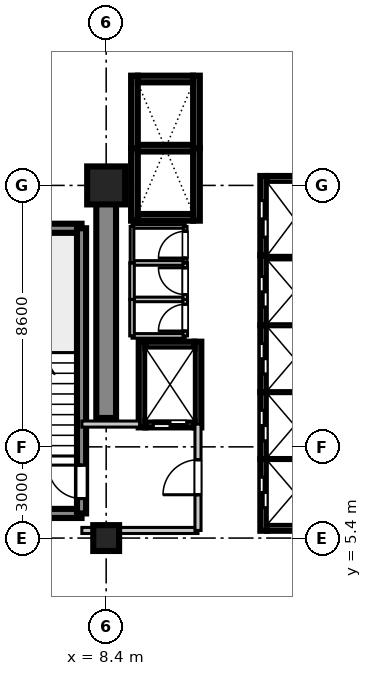
"""IFC4 building model, lengths in metres.
Left out: names, types, materials, properties, quantities, classifications, styles, units other than length and angle.
Written with IfcOpenShell. Run it as: python <this file> out.ifc"""

import sys

from ifc_helpers import new_model, si_unit, direction, frame, frame_2d, origin, origin_2d, place, context, subcontext, project, spatial, rectangle, extrude, source, transform, mapped, element, fill, save


model = new_model("IFC4")
c1 = context("Model", 3, precision=1e-05, world=origin(), true_north=direction((0.0, 1.0)))
c2 = subcontext(c1, "Body", "Model", "MODEL_VIEW")
j1 = project(units=[si_unit("LENGTHUNIT", "METRE"), si_unit("PLANEANGLEUNIT", "RADIAN")], contexts=[c1])
p1 = place(None, origin())
s1 = spatial("IfcSite", under=j1, at=p1, CompositionType="ELEMENT")
p2 = place(p1, origin())
s2 = spatial("IfcBuilding", under=s1, at=p2, CompositionType="ELEMENT")
p3 = place(p2, frame((0.0, 0.0, 88.3)))
s3 = spatial("IfcBuildingStorey", under=s2, at=p3, CompositionType="ELEMENT", Elevation=88.3)
m1 = source(origin(), c2, "Body", "SweptSolid", [
    extrude(rectangle(XDim=0.85, YDim=0.85, at=origin_2d()), origin(), (0.0, 0.0, 1.0), 3.605),
])
p4 = place(p3, frame((8.4, 5.4, 0.0), z_axis=(0.0, 0.0, 1.0), x_axis=(1.0, 0.0, 0.0)))
e1 = element("IfcColumn", 1, at=p4, inside=s3, PredefinedType="PILASTER", context=c2, shape_type="MappedRepresentation", body=[
    mapped(m1, transform((0.0, 0.0, 0.0), scale=1.0)),
])
m2 = source(origin(), c2, "Body", "SweptSolid", [
    extrude(rectangle(XDim=1.25, YDim=1.25, at=origin_2d()), origin(), (0.0, 0.0, 1.0), 3.605),
])
p5 = place(p3, frame((8.4, 17.0, 0.0), z_axis=(0.0, 0.0, 1.0), x_axis=(1.0, 0.0, 0.0)))
e2 = element("IfcColumn", 2, at=p5, inside=s3, PredefinedType="COLUMN", context=c2, shape_type="MappedRepresentation", body=[
    mapped(m2, transform((0.0, 0.0, 0.0), scale=1.0)),
])
m3 = source(origin(), c2, "Body", "SweptSolid", [
    extrude(rectangle(XDim=7.65, YDim=0.65, at=frame_2d((3.825, 0.0))), origin(), (0.0, 0.0, 1.0), 3.38),
])
p6 = place(p3, frame((8.4, 9.35, 0.0), z_axis=(0.0, 0.0, 1.0), x_axis=(0.0, 1.0, 0.0)))
e3 = element("IfcWall", 3, at=p6, inside=s3, PredefinedType="SHEAR", context=c2, shape_type="MappedRepresentation", body=[
    mapped(m3, transform((0.0, 0.0, 0.0), scale=1.0)),
])
m4 = source(origin(), c2, "Body", "SweptSolid", [
    extrude(rectangle(XDim=3.98, YDim=0.3, at=frame_2d((1.99, 0.0))), origin(), (0.0, 0.0, 1.0), 3.38),
])
for number, where, z_axis, x_axis in (
    (4, (3.61, 6.21, 0.0), (0.0, 0.0, 1.0), (1.0, 0.0, 0.0)),
    (5, (3.61, 15.59, 0.0), (0.0, 0.0, 1.0), (1.0, 0.0, 0.0)),
):
    element("IfcWall", number, at=place(p3, frame(where, z_axis=z_axis, x_axis=x_axis)), inside=s3, PredefinedType="SHEAR", context=c2, shape_type="MappedRepresentation", body=[
        mapped(m4, transform((0.0, 0.0, 0.0), scale=1.0)),
    ])
m5 = source(origin(), c2, "Body", "SweptSolid", [
    extrude(rectangle(XDim=9.38, YDim=0.3, at=frame_2d((4.69, 0.0))), origin(), (0.0, 0.0, 1.0), 3.38),
])
p7 = place(p3, frame((7.59, 6.21, 0.0), z_axis=(0.0, 0.0, 1.0), x_axis=(0.0, 1.0, 0.0)))
e6 = element("IfcWall", 6, at=p7, inside=s3, PredefinedType="SHEAR", context=c2, shape_type="MappedRepresentation", body=[
    mapped(m5, transform((0.0, 0.0, 0.0), scale=1.0)),
])
p8 = place(p7, frame((0.49, 0.0, 0.0)))
e7 = element("IfcOpeningElement", 7, at=p8, cuts=e6, PredefinedType="OPENING", context=c2, shape_type="SweptSolid", body=[
    extrude(rectangle(XDim=1.1, YDim=2.15, at=frame_2d((0.55, 1.075))), frame((0.0, 0.16, 0.0), z_axis=(0.0, -1.0, 0.0), x_axis=(1.0, 0.0, 0.0)), (0.0, 0.0, 1.0), 0.32),
])
m6 = source(origin(), c2, "Body", "SweptSolid", [
    extrude(rectangle(XDim=2.36, YDim=0.22, at=frame_2d((1.18, 0.0))), origin(), (0.0, 0.0, 1.0), 3.38),
])
p9 = place(p3, frame((13.58, 5.64, 0.0), z_axis=(0.0, 0.0, 1.0), x_axis=(0.0, 1.0, 0.0)))
e8 = element("IfcWall", 8, at=p9, inside=s3, PredefinedType="SHEAR", context=c2, shape_type="MappedRepresentation", body=[
    mapped(m6, transform((0.0, 0.0, 0.0), scale=1.0)),
])
p10 = place(p9, frame((0.76, 0.0, 0.0)))
e9 = element("IfcOpeningElement", 9, at=p10, cuts=e8, PredefinedType="OPENING", context=c2, shape_type="SweptSolid", body=[
    extrude(rectangle(XDim=1.0, YDim=2.2, at=frame_2d((0.5, 1.1))), frame((0.0, 0.12, 0.0), z_axis=(0.0, -1.0, 0.0), x_axis=(1.0, 0.0, 0.0)), (0.0, 0.0, 1.0), 0.24),
])
m7 = source(origin(), c2, "Body", "SweptSolid", [
    extrude(rectangle(XDim=1.82, YDim=0.22, at=frame_2d((0.91, 0.0))), origin(), (0.0, 0.0, 1.0), 3.38),
])
p11 = place(p3, frame((13.69, 5.75, 0.0), z_axis=(0.0, 0.0, 1.0), x_axis=(1.0, 0.0, 0.0)))
e10 = element("IfcWall", 10, at=p11, inside=s3, PredefinedType="SHEAR", context=c2, shape_type="MappedRepresentation", body=[
    mapped(m7, transform((0.0, 0.0, 0.0), scale=1.0)),
])
m8 = source(origin(), c2, "Body", "SweptSolid", [
    extrude(rectangle(XDim=1.82, YDim=0.22, at=frame_2d((0.91, 0.0))), origin(), (0.0, 0.0, 1.0), 3.65),
])
p12 = place(p3, frame((13.69, 8.0, 0.0), z_axis=(0.0, 0.0, 1.0), x_axis=(1.0, 0.0, 0.0)))
e11 = element("IfcWall", 11, at=p12, inside=s3, PredefinedType="SHEAR", context=c2, shape_type="MappedRepresentation", body=[
    mapped(m8, transform((0.0, 0.0, 0.0), scale=1.0)),
])
m9 = source(origin(), c2, "Body", "SweptSolid", [
    extrude(rectangle(XDim=2.2, YDim=0.22, at=frame_2d((1.1, 0.0))), origin(), (0.0, 0.0, 1.0), 3.38),
])
p13 = place(p3, frame((13.58, 8.0, 0.0), z_axis=(0.0, 0.0, 1.0), x_axis=(0.0, 1.0, 0.0)))
e12 = element("IfcWall", 12, at=p13, inside=s3, PredefinedType="SHEAR", context=c2, shape_type="MappedRepresentation", body=[
    mapped(m9, transform((0.0, 0.0, 0.0), scale=1.0)),
])
p14 = place(p13, frame((0.6, 0.0, 0.0)))
e13 = element("IfcOpeningElement", 13, at=p14, cuts=e12, PredefinedType="OPENING", context=c2, shape_type="SweptSolid", body=[
    extrude(rectangle(XDim=1.0, YDim=2.2, at=frame_2d((0.5, 1.1))), frame((0.0, 0.12, 0.0), z_axis=(0.0, -1.0, 0.0), x_axis=(1.0, 0.0, 0.0)), (0.0, 0.0, 1.0), 0.24),
])
p15 = place(p3, frame((13.69, 10.2, 0.0), z_axis=(0.0, 0.0, 1.0), x_axis=(1.0, 0.0, 0.0)))
e14 = element("IfcWall", 14, at=p15, inside=s3, PredefinedType="SHEAR", context=c2, shape_type="MappedRepresentation", body=[
    mapped(m8, transform((0.0, 0.0, 0.0), scale=1.0)),
])
p16 = place(p3, frame((13.58, 10.2, 0.0), z_axis=(0.0, 0.0, 1.0), x_axis=(0.0, 1.0, 0.0)))
e15 = element("IfcWall", 15, at=p16, inside=s3, PredefinedType="SHEAR", context=c2, shape_type="MappedRepresentation", body=[
    mapped(m9, transform((0.0, 0.0, 0.0), scale=1.0)),
])
p17 = place(p16, frame((0.6, 0.0, 0.0)))
e16 = element("IfcOpeningElement", 16, at=p17, cuts=e15, PredefinedType="OPENING", context=c2, shape_type="SweptSolid", body=[
    extrude(rectangle(XDim=1.0, YDim=2.2, at=frame_2d((0.5, 1.1))), frame((0.0, 0.12, 0.0), z_axis=(0.0, -1.0, 0.0), x_axis=(1.0, 0.0, 0.0)), (0.0, 0.0, 1.0), 0.24),
])
p18 = place(p3, frame((13.69, 12.4, 0.0), z_axis=(0.0, 0.0, 1.0), x_axis=(1.0, 0.0, 0.0)))
e17 = element("IfcWall", 17, at=p18, inside=s3, PredefinedType="SHEAR", context=c2, shape_type="MappedRepresentation", body=[
    mapped(m8, transform((0.0, 0.0, 0.0), scale=1.0)),
])
m10 = source(origin(), c2, "Body", "SweptSolid", [
    extrude(rectangle(XDim=2.3, YDim=0.22, at=frame_2d((1.15, 0.0))), origin(), (0.0, 0.0, 1.0), 3.38),
])
p19 = place(p3, frame((13.58, 12.4, 0.0), z_axis=(0.0, 0.0, 1.0), x_axis=(0.0, 1.0, 0.0)))
e18 = element("IfcWall", 18, at=p19, inside=s3, PredefinedType="SHEAR", context=c2, shape_type="MappedRepresentation", body=[
    mapped(m10, transform((0.0, 0.0, 0.0), scale=1.0)),
])
p20 = place(p19, frame((0.6, 0.0, 0.0)))
e19 = element("IfcOpeningElement", 19, at=p20, cuts=e18, PredefinedType="OPENING", context=c2, shape_type="SweptSolid", body=[
    extrude(rectangle(XDim=1.0, YDim=2.2, at=frame_2d((0.5, 1.1))), frame((0.0, 0.12, 0.0), z_axis=(0.0, -1.0, 0.0), x_axis=(1.0, 0.0, 0.0)), (0.0, 0.0, 1.0), 0.24),
])
p21 = place(p3, frame((13.69, 14.7, 0.0), z_axis=(0.0, 0.0, 1.0), x_axis=(1.0, 0.0, 0.0)))
e20 = element("IfcWall", 20, at=p21, inside=s3, PredefinedType="SHEAR", context=c2, shape_type="MappedRepresentation", body=[
    mapped(m8, transform((0.0, 0.0, 0.0), scale=1.0)),
])
m11 = source(origin(), c2, "Body", "SweptSolid", [
    extrude(rectangle(XDim=2.385, YDim=0.22, at=frame_2d((1.192, 0.0))), origin(), (0.0, 0.0, 1.0), 3.38),
])
for number, where, z_axis, x_axis in (
    (21, (9.33, 15.84, 0.0), (0.0, 0.0, 1.0), (0.0, 1.0, 0.0)),
    (22, (11.37, 15.84, 0.0), (0.0, 0.0, 1.0), (0.0, 1.0, 0.0)),
):
    element("IfcWall", number, at=place(p3, frame(where, z_axis=z_axis, x_axis=x_axis)), inside=s3, PredefinedType="SHEAR", context=c2, shape_type="MappedRepresentation", body=[
        mapped(m11, transform((0.0, 0.0, 0.0), scale=1.0)),
    ])
p22 = place(p3, frame((9.44, 15.95, 0.0), z_axis=(0.0, 0.0, 1.0), x_axis=(1.0, 0.0, 0.0)))
e23 = element("IfcWall", 23, at=p22, inside=s3, PredefinedType="SHEAR", context=c2, shape_type="MappedRepresentation", body=[
    mapped(m7, transform((0.0, 0.0, 0.0), scale=1.0)),
])
p23 = place(p3, frame((9.44, 18.225, 0.0), z_axis=(0.0, 0.0, 1.0), x_axis=(1.0, 0.0, 0.0)))
e24 = element("IfcWall", 24, at=p23, inside=s3, PredefinedType="SHEAR", context=c2, shape_type="MappedRepresentation", body=[
    mapped(m8, transform((0.0, 0.0, 0.0), scale=1.0)),
])
for number, where, z_axis, x_axis in (
    (25, (9.33, 18.225, 0.0), (0.0, 0.0, 1.0), (0.0, 1.0, 0.0)),
    (26, (11.37, 18.225, 0.0), (0.0, 0.0, 1.0), (0.0, 1.0, 0.0)),
):
    element("IfcWall", number, at=place(p3, frame(where, z_axis=z_axis, x_axis=x_axis)), inside=s3, PredefinedType="SHEAR", context=c2, shape_type="MappedRepresentation", body=[
        mapped(m11, transform((0.0, 0.0, 0.0), scale=1.0)),
    ])
p24 = place(p3, frame((9.44, 20.5, 0.0), z_axis=(0.0, 0.0, 1.0), x_axis=(1.0, 0.0, 0.0)))
e27 = element("IfcWall", 27, at=p24, inside=s3, PredefinedType="SHEAR", context=c2, shape_type="MappedRepresentation", body=[
    mapped(m7, transform((0.0, 0.0, 0.0), scale=1.0)),
])
m12 = source(origin(), c2, "Body", "SweptSolid", [
    extrude(rectangle(XDim=2.82, YDim=0.22, at=frame_2d((1.41, 0.0))), origin(), (0.0, 0.0, 1.0), 3.38),
])
for number, where, z_axis, x_axis in (
    (28, (9.58, 9.04, 0.0), (0.0, 0.0, 1.0), (0.0, 1.0, 0.0)),
    (29, (11.42, 9.04, 0.0), (0.0, 0.0, 1.0), (0.0, 1.0, 0.0)),
):
    element("IfcWall", number, at=place(p3, frame(where, z_axis=z_axis, x_axis=x_axis)), inside=s3, PredefinedType="SHEAR", context=c2, shape_type="MappedRepresentation", body=[
        mapped(m12, transform((0.0, 0.0, 0.0), scale=1.0)),
    ])
m13 = source(origin(), c2, "Body", "SweptSolid", [
    extrude(rectangle(XDim=1.62, YDim=0.22, at=frame_2d((0.81, 0.0))), origin(), (0.0, 0.0, 1.0), 3.38),
])
p25 = place(p3, frame((9.69, 9.15, 0.0), z_axis=(0.0, 0.0, 1.0), x_axis=(1.0, 0.0, 0.0)))
e30 = element("IfcWall", 30, at=p25, inside=s3, PredefinedType="SHEAR", context=c2, shape_type="MappedRepresentation", body=[
    mapped(m13, transform((0.0, 0.0, 0.0), scale=1.0)),
])
p26 = place(p25, frame((0.26, 0.0, 0.0)))
e31 = element("IfcOpeningElement", 31, at=p26, cuts=e30, PredefinedType="OPENING", context=c2, shape_type="SweptSolid", body=[
    extrude(rectangle(XDim=1.1, YDim=2.2, at=frame_2d((0.55, 1.1))), frame((0.0, 0.12, 0.0), z_axis=(0.0, -1.0, 0.0), x_axis=(1.0, 0.0, 0.0)), (0.0, 0.0, 1.0), 0.24),
])
p27 = place(p3, frame((9.69, 11.75, 0.0), z_axis=(0.0, 0.0, 1.0), x_axis=(1.0, 0.0, 0.0)))
e32 = element("IfcWall", 32, at=p27, inside=s3, PredefinedType="SHEAR", context=c2, shape_type="MappedRepresentation", body=[
    mapped(m13, transform((0.0, 0.0, 0.0), scale=1.0)),
])
m14 = source(origin(), c2, "Body", "SweptSolid", [
    extrude(rectangle(XDim=2.61, YDim=0.22, at=frame_2d((1.305, 0.0))), origin(), (0.0, 0.0, 1.0), 3.38),
])
p28 = place(p3, frame((13.58, 14.7, 0.0), z_axis=(0.0, 0.0, 1.0), x_axis=(0.0, 1.0, 0.0)))
e33 = element("IfcWall", 33, at=p28, inside=s3, PredefinedType="SHEAR", context=c2, shape_type="MappedRepresentation", body=[
    mapped(m14, transform((0.0, 0.0, 0.0), scale=1.0)),
])
p29 = place(p28, frame((0.6, 0.0, 0.0)))
e34 = element("IfcOpeningElement", 34, at=p29, cuts=e33, PredefinedType="OPENING", context=c2, shape_type="SweptSolid", body=[
    extrude(rectangle(XDim=1.2, YDim=2.2, at=frame_2d((0.6, 1.1))), frame((0.0, 0.12, 0.0), z_axis=(0.0, -1.0, 0.0), x_axis=(1.0, 0.0, 0.0)), (0.0, 0.0, 1.0), 0.24),
])
p30 = place(p3, frame((13.69, 17.2, 0.0), z_axis=(0.0, 0.0, 1.0), x_axis=(1.0, 0.0, 0.0)))
e35 = element("IfcWall", 35, at=p30, inside=s3, PredefinedType="SHEAR", context=c2, shape_type="MappedRepresentation", body=[
    mapped(m7, transform((0.0, 0.0, 0.0), scale=1.0)),
])
m15 = source(origin(), c2, "Body", "SweptSolid", [
    extrude(rectangle(XDim=3.82, YDim=0.2, at=frame_2d((1.91, 0.0))), origin(), (0.0, 0.0, 1.0), 2.72),
])
p31 = place(p3, frame((7.6, 5.65, 0.0), z_axis=(0.0, 0.0, 1.0), x_axis=(1.0, 0.0, 0.0)))
e36 = element("IfcWall", 36, at=p31, inside=s3, PredefinedType="PARTITIONING", context=c2, shape_type="MappedRepresentation", body=[
    mapped(m15, transform((0.0, 0.0, 0.0), scale=1.0)),
])
m16 = source(origin(), c2, "Body", "SweptSolid", [
    extrude(rectangle(XDim=1.9, YDim=0.2, at=frame_2d((0.95, 0.0))), origin(), (0.0, 0.0, 1.0), 2.72),
])
p32 = place(p3, frame((7.6, 9.15, 0.0), z_axis=(0.0, 0.0, 1.0), x_axis=(1.0, 0.0, 0.0)))
e37 = element("IfcWall", 37, at=p32, inside=s3, PredefinedType="PARTITIONING", context=c2, shape_type="MappedRepresentation", body=[
    mapped(m16, transform((0.0, 0.0, 0.0), scale=1.0)),
])
m17 = source(origin(), c2, "Body", "SweptSolid", [
    extrude(rectangle(XDim=3.5, YDim=0.2, at=frame_2d((1.75, 0.0))), origin(), (0.0, 0.0, 1.0), 2.72),
])
p33 = place(p3, frame((11.42, 5.65, 0.0), z_axis=(0.0, 0.0, 1.0), x_axis=(0.0, 1.0, 0.0)))
e38 = element("IfcWall", 38, at=p33, inside=s3, PredefinedType="PARTITIONING", context=c2, shape_type="MappedRepresentation", body=[
    mapped(m17, transform((0.0, 0.0, 0.0), scale=1.0)),
])
p34 = place(p33, frame((1.175, 0.0, 0.0)))
e39 = element("IfcOpeningElement", 39, at=p34, cuts=e38, PredefinedType="OPENING", context=c2, shape_type="SweptSolid", body=[
    extrude(rectangle(XDim=1.15, YDim=2.15, at=frame_2d((0.575, 1.075))), frame((0.0, 0.11, 0.0), z_axis=(0.0, -1.0, 0.0), x_axis=(1.0, 0.0, 0.0)), (0.0, 0.0, 1.0), 0.22),
])
m18 = source(origin(), c2, "Body", "SweptSolid", [
    extrude(rectangle(XDim=1.75, YDim=0.15, at=frame_2d((0.875, 0.0))), origin(), (0.0, 0.0, 1.0), 2.72),
])
for number, where, z_axis, x_axis in (
    (40, (9.25, 12.05, 0.0), (0.0, 0.0, 1.0), (1.0, 0.0, 0.0)),
    (41, (9.25, 13.25, 0.0), (0.0, 0.0, 1.0), (1.0, 0.0, 0.0)),
):
    element("IfcWall", number, at=place(p3, frame(where, z_axis=z_axis, x_axis=x_axis)), inside=s3, PredefinedType="PARTITIONING", context=c2, shape_type="MappedRepresentation", body=[
        mapped(m18, transform((0.0, 0.0, 0.0), scale=1.0)),
    ])
m19 = source(origin(), c2, "Body", "SweptSolid", [
    extrude(rectangle(XDim=1.2, YDim=0.15, at=frame_2d((0.6, 0.0))), origin(), (0.0, 0.0, 1.0), 2.72),
])
p35 = place(p3, frame((9.25, 12.05, 0.0), z_axis=(0.0, 0.0, 1.0), x_axis=(0.0, 1.0, 0.0)))
e42 = element("IfcWall", 42, at=p35, inside=s3, PredefinedType="PARTITIONING", context=c2, shape_type="MappedRepresentation", body=[
    mapped(m19, transform((0.0, 0.0, 0.0), scale=1.0)),
])
p36 = place(p3, frame((11.0, 12.05, 0.0), z_axis=(0.0, 0.0, 1.0), x_axis=(0.0, 1.0, 0.0)))
e43 = element("IfcWall", 43, at=p36, inside=s3, PredefinedType="PARTITIONING", context=c2, shape_type="MappedRepresentation", body=[
    mapped(m19, transform((0.0, 0.0, 0.0), scale=1.0)),
])
p37 = place(p36, frame((0.16, 0.0, 0.0)))
e44 = element("IfcOpeningElement", 44, at=p37, cuts=e43, PredefinedType="OPENING", context=c2, shape_type="SweptSolid", body=[
    extrude(rectangle(XDim=0.88, YDim=2.1, at=frame_2d((0.44, 1.05))), frame((0.0, 0.085, 0.0), z_axis=(0.0, -1.0, 0.0), x_axis=(1.0, 0.0, 0.0)), (0.0, 0.0, 1.0), 0.17),
])
p38 = place(p3, frame((9.25, 14.45, 0.0), z_axis=(0.0, 0.0, 1.0), x_axis=(1.0, 0.0, 0.0)))
e45 = element("IfcWall", 45, at=p38, inside=s3, PredefinedType="PARTITIONING", context=c2, shape_type="MappedRepresentation", body=[
    mapped(m18, transform((0.0, 0.0, 0.0), scale=1.0)),
])
p39 = place(p3, frame((9.25, 13.25, 0.0), z_axis=(0.0, 0.0, 1.0), x_axis=(0.0, 1.0, 0.0)))
e46 = element("IfcWall", 46, at=p39, inside=s3, PredefinedType="PARTITIONING", context=c2, shape_type="MappedRepresentation", body=[
    mapped(m19, transform((0.0, 0.0, 0.0), scale=1.0)),
])
p40 = place(p3, frame((11.0, 13.25, 0.0), z_axis=(0.0, 0.0, 1.0), x_axis=(0.0, 1.0, 0.0)))
e47 = element("IfcWall", 47, at=p40, inside=s3, PredefinedType="PARTITIONING", context=c2, shape_type="MappedRepresentation", body=[
    mapped(m19, transform((0.0, 0.0, 0.0), scale=1.0)),
])
p41 = place(p40, frame((0.16, 0.0, 0.0)))
e48 = element("IfcOpeningElement", 48, at=p41, cuts=e47, PredefinedType="OPENING", context=c2, shape_type="SweptSolid", body=[
    extrude(rectangle(XDim=0.88, YDim=2.1, at=frame_2d((0.44, 1.05))), frame((0.0, 0.085, 0.0), z_axis=(0.0, -1.0, 0.0), x_axis=(1.0, 0.0, 0.0)), (0.0, 0.0, 1.0), 0.17),
])
m20 = source(origin(), c2, "Body", "SweptSolid", [
    extrude(rectangle(XDim=1.75, YDim=0.12, at=frame_2d((0.875, 0.0))), origin(), (0.0, 0.0, 1.0), 2.72),
])
p42 = place(p3, frame((9.25, 15.65, 0.0), z_axis=(0.0, 0.0, 1.0), x_axis=(1.0, 0.0, 0.0)))
e49 = element("IfcWall", 49, at=p42, inside=s3, PredefinedType="PARTITIONING", context=c2, shape_type="MappedRepresentation", body=[
    mapped(m20, transform((0.0, 0.0, 0.0), scale=1.0)),
])
m21 = source(origin(), c2, "Body", "SweptSolid", [
    extrude(rectangle(XDim=1.2, YDim=0.12, at=frame_2d((0.6, 0.0))), origin(), (0.0, 0.0, 1.0), 2.72),
])
p43 = place(p3, frame((9.25, 14.45, 0.0), z_axis=(0.0, 0.0, 1.0), x_axis=(0.0, 1.0, 0.0)))
e50 = element("IfcWall", 50, at=p43, inside=s3, PredefinedType="PARTITIONING", context=c2, shape_type="MappedRepresentation", body=[
    mapped(m21, transform((0.0, 0.0, 0.0), scale=1.0)),
])
p44 = place(p3, frame((11.0, 14.45, 0.0), z_axis=(0.0, 0.0, 1.0), x_axis=(0.0, 1.0, 0.0)))
e51 = element("IfcWall", 51, at=p44, inside=s3, PredefinedType="PARTITIONING", context=c2, shape_type="MappedRepresentation", body=[
    mapped(m21, transform((0.0, 0.0, 0.0), scale=1.0)),
])
p45 = place(p44, frame((0.16, 0.0, 0.0)))
e52 = element("IfcOpeningElement", 52, at=p45, cuts=e51, PredefinedType="OPENING", context=c2, shape_type="SweptSolid", body=[
    extrude(rectangle(XDim=0.88, YDim=2.1, at=frame_2d((0.44, 1.05))), frame((0.0, 0.07, 0.0), z_axis=(0.0, -1.0, 0.0), x_axis=(1.0, 0.0, 0.0)), (0.0, 0.0, 1.0), 0.14),
])
m22 = source(origin(), c2, "Body", "SweptSolid", [
    extrude(rectangle(XDim=1.1, YDim=2.15, at=frame_2d((0.55, 1.075))), frame((0.0, 0.025, 0.0), z_axis=(0.0, -1.0, 0.0), x_axis=(1.0, 0.0, 0.0)), (0.0, 0.0, 1.0), 0.05),
])
p46 = place(p8, origin())
e53 = element("IfcDoor", 53, at=p46, inside=s3, OperationType="SINGLE_SWING_RIGHT", PredefinedType="DOOR", context=c2, shape_type="MappedRepresentation", body=[
    mapped(m22, transform((0.0, 0.0, 0.0), scale=1.0)),
])
fill(e7, e53)
m23 = source(origin(), c2, "Body", "SweptSolid", [
    extrude(rectangle(XDim=1.0, YDim=2.2, at=frame_2d((0.5, 1.1))), frame((0.0, 0.025, 0.0), z_axis=(0.0, -1.0, 0.0), x_axis=(1.0, 0.0, 0.0)), (0.0, 0.0, 1.0), 0.05),
])
p47 = place(p10, origin())
e54 = element("IfcDoor", 54, at=p47, inside=s3, OperationType="DOUBLE_DOOR_SLIDING", PredefinedType="DOOR", context=c2, shape_type="MappedRepresentation", body=[
    mapped(m23, transform((0.0, 0.0, 0.0), scale=1.0)),
])
fill(e9, e54)
p48 = place(p14, origin())
e55 = element("IfcDoor", 55, at=p48, inside=s3, OperationType="DOUBLE_DOOR_SLIDING", PredefinedType="DOOR", context=c2, shape_type="MappedRepresentation", body=[
    mapped(m23, transform((0.0, 0.0, 0.0), scale=1.0)),
])
fill(e13, e55)
p49 = place(p17, origin())
e56 = element("IfcDoor", 56, at=p49, inside=s3, OperationType="DOUBLE_DOOR_SLIDING", PredefinedType="DOOR", context=c2, shape_type="MappedRepresentation", body=[
    mapped(m23, transform((0.0, 0.0, 0.0), scale=1.0)),
])
fill(e16, e56)
p50 = place(p20, origin())
e57 = element("IfcDoor", 57, at=p50, inside=s3, OperationType="DOUBLE_DOOR_SLIDING", PredefinedType="DOOR", context=c2, shape_type="MappedRepresentation", body=[
    mapped(m23, transform((0.0, 0.0, 0.0), scale=1.0)),
])
fill(e19, e57)
m24 = source(origin(), c2, "Body", "SweptSolid", [
    extrude(rectangle(XDim=1.1, YDim=2.2, at=frame_2d((0.55, 1.1))), frame((0.0, 0.025, 0.0), z_axis=(0.0, -1.0, 0.0), x_axis=(1.0, 0.0, 0.0)), (0.0, 0.0, 1.0), 0.05),
])
p51 = place(p26, frame((1.1, 0.0, 0.0), z_axis=(0.0, 0.0, 1.0), x_axis=(-1.0, 0.0, 0.0)))
e58 = element("IfcDoor", 58, at=p51, inside=s3, OperationType="DOUBLE_DOOR_SLIDING", PredefinedType="DOOR", context=c2, shape_type="MappedRepresentation", body=[
    mapped(m24, transform((0.0, 0.0, 0.0), scale=1.0)),
])
fill(e31, e58)
m25 = source(origin(), c2, "Body", "SweptSolid", [
    extrude(rectangle(XDim=1.2, YDim=2.2, at=frame_2d((0.6, 1.1))), frame((0.0, 0.025, 0.0), z_axis=(0.0, -1.0, 0.0), x_axis=(1.0, 0.0, 0.0)), (0.0, 0.0, 1.0), 0.05),
])
p52 = place(p29, origin())
e59 = element("IfcDoor", 59, at=p52, inside=s3, OperationType="DOUBLE_DOOR_SLIDING", PredefinedType="DOOR", context=c2, shape_type="MappedRepresentation", body=[
    mapped(m25, transform((0.0, 0.0, 0.0), scale=1.0)),
])
fill(e34, e59)
m26 = source(origin(), c2, "Body", "SweptSolid", [
    extrude(rectangle(XDim=1.15, YDim=2.15, at=frame_2d((0.575, 1.075))), frame((0.0, 0.025, 0.0), z_axis=(0.0, -1.0, 0.0), x_axis=(1.0, 0.0, 0.0)), (0.0, 0.0, 1.0), 0.05),
])
p53 = place(p34, frame((1.15, 0.0, 0.0), z_axis=(0.0, 0.0, 1.0), x_axis=(-1.0, 0.0, 0.0)))
e60 = element("IfcDoor", 60, at=p53, inside=s3, OperationType="SINGLE_SWING_LEFT", PredefinedType="DOOR", context=c2, shape_type="MappedRepresentation", body=[
    mapped(m26, transform((0.0, 0.0, 0.0), scale=1.0)),
])
fill(e39, e60)
m27 = source(origin(), c2, "Body", "SweptSolid", [
    extrude(rectangle(XDim=0.88, YDim=2.1, at=frame_2d((0.44, 1.05))), frame((0.0, 0.025, 0.0), z_axis=(0.0, -1.0, 0.0), x_axis=(1.0, 0.0, 0.0)), (0.0, 0.0, 1.0), 0.05),
])
p54 = place(p37, origin())
e61 = element("IfcDoor", 61, at=p54, inside=s3, OperationType="SINGLE_SWING_LEFT", PredefinedType="DOOR", context=c2, shape_type="MappedRepresentation", body=[
    mapped(m27, transform((0.0, 0.0, 0.0), scale=1.0)),
])
fill(e44, e61)
p55 = place(p41, origin())
e62 = element("IfcDoor", 62, at=p55, inside=s3, OperationType="SINGLE_SWING_RIGHT", PredefinedType="DOOR", context=c2, shape_type="MappedRepresentation", body=[
    mapped(m27, transform((0.0, 0.0, 0.0), scale=1.0)),
])
fill(e48, e62)
p56 = place(p45, origin())
e63 = element("IfcDoor", 63, at=p56, inside=s3, OperationType="SINGLE_SWING_LEFT", PredefinedType="DOOR", context=c2, shape_type="MappedRepresentation", body=[
    mapped(m27, transform((0.0, 0.0, 0.0), scale=1.0)),
])
fill(e52, e63)
save(model, sys.argv[1])
